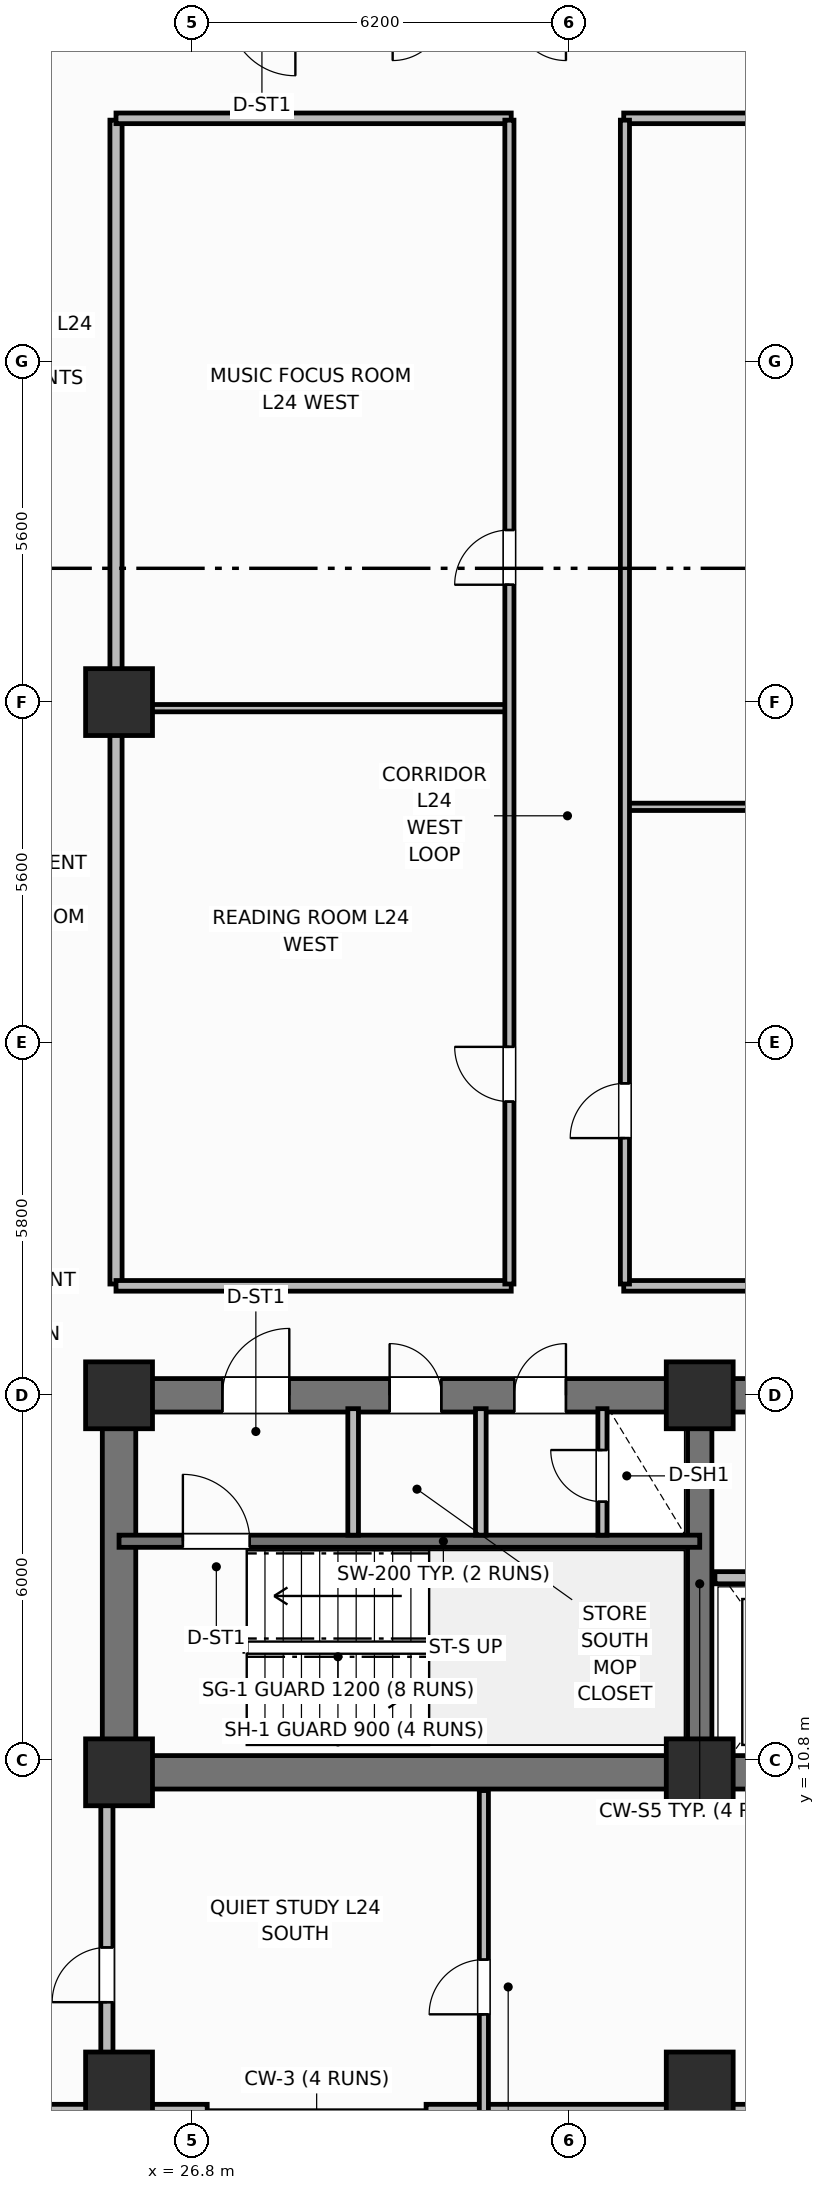
"""IFC4 building model, lengths in metres.
Left out: names, types, materials, properties, quantities, classifications, styles, units other than length and angle.
Written with IfcOpenShell. Run it as: python <this file> out.ifc"""

import sys

from ifc_helpers import new_model, si_unit, direction, frame, frame_2d, origin, origin_2d, place, context, subcontext, project, spatial, rectangle, extrude, element, fill, save


model = new_model("IFC4")
c1 = context("Model", 3, precision=1e-05, world=origin(), true_north=direction((0.0, 1.0)))
c2 = subcontext(c1, "Body", "Model", "MODEL_VIEW")
j1 = project(units=[si_unit("LENGTHUNIT", "METRE"), si_unit("PLANEANGLEUNIT", "RADIAN")], contexts=[c1])
p1 = place(None, origin())
s1 = spatial("IfcSite", under=j1, at=p1, CompositionType="ELEMENT")
p2 = place(p1, origin())
s2 = spatial("IfcBuilding", under=s1, at=p2, CompositionType="ELEMENT")
p3 = place(p2, frame((0.0, 0.0, 99.4)))
s3 = spatial("IfcBuildingStorey", under=s2, at=p3, CompositionType="ELEMENT", Elevation=99.4)
p4 = place(p3, frame((52.8, 10.6, 0.0), z_axis=(0.0, 0.0, 1.0), x_axis=(-1.0, 0.0, 0.0)))
e1 = element("IfcWall", 1, at=p4, inside=s3, PredefinedType="SHEAR", context=c2, shape_type="SweptSolid", body=[
    extrude(rectangle(XDim=27.2, YDim=0.55, at=frame_2d((13.6, 0.0))), origin(), (0.0, 0.0, 1.0), 3.7),
])
p5 = place(p3, frame((25.6, 10.875, 0.0), z_axis=(0.0, 0.0, 1.0), x_axis=(0.0, 1.0, 0.0)))
e2 = element("IfcWall", 2, at=p5, inside=s3, PredefinedType="SHEAR", context=c2, shape_type="SweptSolid", body=[
    extrude(rectangle(XDim=5.65, YDim=0.55, at=frame_2d((2.825, 0.0))), origin(), (0.0, 0.0, 1.0), 3.7),
])
p6 = place(p3, frame((25.6, 16.8, 0.0), z_axis=(0.0, 0.0, 1.0), x_axis=(1.0, 0.0, 0.0)))
e3 = element("IfcWall", 3, at=p6, inside=s3, PredefinedType="SHEAR", context=c2, shape_type="SweptSolid", body=[
    extrude(rectangle(XDim=27.2, YDim=0.55, at=frame_2d((13.6, 0.0))), origin(), (0.0, 0.0, 1.0), 3.7),
])
p7 = place(p6, frame((1.7, 0.0, 0.0)))
e4 = element("IfcOpeningElement", 4, at=p7, cuts=e3, PredefinedType="OPENING", context=c2, shape_type="SweptSolid", body=[
    extrude(rectangle(XDim=1.1, YDim=2.15, at=frame_2d((0.55, 1.075))), frame((0.0, 0.285, 0.0), z_axis=(0.0, -1.0, 0.0), x_axis=(1.0, 0.0, 0.0)), (0.0, 0.0, 1.0), 0.57),
])
p8 = place(p6, frame((4.45, 0.0, 0.0)))
e5 = element("IfcOpeningElement", 5, at=p8, cuts=e3, PredefinedType="OPENING", context=c2, shape_type="SweptSolid", body=[
    extrude(rectangle(XDim=0.85, YDim=2.1, at=frame_2d((0.425, 1.05))), frame((0.0, 0.285, 0.0), z_axis=(0.0, -1.0, 0.0), x_axis=(1.0, 0.0, 0.0)), (0.0, 0.0, 1.0), 0.57),
])
p9 = place(p6, frame((6.5, 0.0, 0.0)))
e6 = element("IfcOpeningElement", 6, at=p9, cuts=e3, PredefinedType="OPENING", context=c2, shape_type="SweptSolid", body=[
    extrude(rectangle(XDim=0.85, YDim=2.1, at=frame_2d((0.425, 1.05))), frame((0.0, 0.285, 0.0), z_axis=(0.0, -1.0, 0.0), x_axis=(1.0, 0.0, 0.0)), (0.0, 0.0, 1.0), 0.57),
])
p10 = place(p6, frame((13.0, 0.0, 0.0)))
e7 = element("IfcOpeningElement", 7, at=p10, cuts=e3, PredefinedType="OPENING", context=c2, shape_type="SweptSolid", body=[
    extrude(rectangle(XDim=1.2, YDim=2.15, at=frame_2d((0.6, 1.075))), frame((0.0, 0.285, 0.0), z_axis=(0.0, -1.0, 0.0), x_axis=(1.0, 0.0, 0.0)), (0.0, 0.0, 1.0), 0.57),
])
p11 = place(p6, frame((19.8, 0.0, 0.0)))
e8 = element("IfcOpeningElement", 8, at=p11, cuts=e3, PredefinedType="OPENING", context=c2, shape_type="SweptSolid", body=[
    extrude(rectangle(XDim=0.85, YDim=2.1, at=frame_2d((0.425, 1.05))), frame((0.0, 0.285, 0.0), z_axis=(0.0, -1.0, 0.0), x_axis=(1.0, 0.0, 0.0)), (0.0, 0.0, 1.0), 0.57),
])
p12 = place(p6, frame((24.2, 0.0, 0.0)))
e9 = element("IfcOpeningElement", 9, at=p12, cuts=e3, PredefinedType="OPENING", context=c2, shape_type="SweptSolid", body=[
    extrude(rectangle(XDim=0.85, YDim=2.1, at=frame_2d((0.425, 1.05))), frame((0.0, 0.285, 0.0), z_axis=(0.0, -1.0, 0.0), x_axis=(1.0, 0.0, 0.0)), (0.0, 0.0, 1.0), 0.57),
])
p13 = place(p3, frame((35.15, 10.875, 0.0), z_axis=(0.0, 0.0, 1.0), x_axis=(0.0, 1.0, 0.0)))
e10 = element("IfcWall", 10, at=p13, inside=s3, PredefinedType="SHEAR", context=c2, shape_type="SweptSolid", body=[
    extrude(rectangle(XDim=5.65, YDim=0.4, at=frame_2d((2.825, 0.0))), origin(), (0.0, 0.0, 1.0), 3.7),
])
for number, where, z_axis, x_axis in (
    (11, (25.6, 10.6, 0.0), (0.0, 0.0, 1.0), (1.0, 0.0, 0.0)),
    (12, (25.6, 16.8, 0.0), (0.0, 0.0, 1.0), (1.0, 0.0, 0.0)),
    (13, (35.15, 10.6, 0.0), (0.0, 0.0, 1.0), (1.0, 0.0, 0.0)),
    (14, (35.15, 16.8, 0.0), (0.0, 0.0, 1.0), (1.0, 0.0, 0.0)),
    (15, (25.6, 28.2, 0.0), (0.0, 0.0, 1.0), (1.0, 0.0, 0.0)),
    (16, (25.6, 5.45, 0.0), (0.0, 0.0, 1.0), (1.0, 0.0, 0.0)),
    (17, (35.15, 5.45, 0.0), (0.0, 0.0, 1.0), (1.0, 0.0, 0.0)),
):
    element("IfcColumn", number, at=place(p3, frame(where, z_axis=z_axis, x_axis=x_axis)), inside=s3, PredefinedType="COLUMN", context=c2, shape_type="SweptSolid", body=[
        extrude(rectangle(XDim=1.1, YDim=1.1, at=origin_2d()), origin(), (0.0, 0.0, 1.0), 3.7),
    ])
p14 = place(p3, frame((18.6, 4.97, 0.0), z_axis=(0.0, 0.0, 1.0), x_axis=(1.0, 0.0, 0.0)))
e18 = element("IfcWall", 18, at=p14, inside=s3, PredefinedType="SOLIDWALL", context=c2, shape_type="SweptSolid", body=[
    extrude(rectangle(XDim=8.45, YDim=0.34, at=frame_2d((4.225, 0.0))), origin(), (0.0, 0.0, 1.0), 2.7),
])
p15 = place(p3, frame((30.65, 4.97, 0.0), z_axis=(0.0, 0.0, 1.0), x_axis=(1.0, 0.0, 0.0)))
e19 = element("IfcWall", 19, at=p15, inside=s3, PredefinedType="SOLIDWALL", context=c2, shape_type="SweptSolid", body=[
    extrude(rectangle(XDim=5.35, YDim=0.34, at=frame_2d((2.675, 0.0))), origin(), (0.0, 0.0, 1.0), 2.7),
])
p16 = place(p3, frame((25.6, 14.4, 0.0), z_axis=(0.0, 0.0, 1.0), x_axis=(1.0, 0.0, 0.0)))
e20 = element("IfcWall", 20, at=p16, inside=s3, PredefinedType="SHEAR", context=c2, shape_type="SweptSolid", body=[
    extrude(rectangle(XDim=9.55, YDim=0.2, at=frame_2d((4.775, 0.0))), origin(), (0.0, 0.0, 1.0), 3.7),
])
p17 = place(p16, frame((1.05, 0.0, 0.0)))
e21 = element("IfcOpeningElement", 21, at=p17, cuts=e20, PredefinedType="OPENING", context=c2, shape_type="SweptSolid", body=[
    extrude(rectangle(XDim=1.1, YDim=2.15, at=frame_2d((0.55, 1.075))), frame((0.0, 0.11, 0.0), z_axis=(0.0, -1.0, 0.0), x_axis=(1.0, 0.0, 0.0)), (0.0, 0.0, 1.0), 0.22),
])
for number, where, z_axis, x_axis in (
    (22, (29.45, 14.5, 0.0), (0.0, 0.0, 1.0), (0.0, 1.0, 0.0)),
    (23, (31.55, 14.5, 0.0), (0.0, 0.0, 1.0), (0.0, 1.0, 0.0)),
):
    element("IfcWall", number, at=place(p3, frame(where, z_axis=z_axis, x_axis=x_axis)), inside=s3, PredefinedType="PARTITIONING", context=c2, shape_type="SweptSolid", body=[
        extrude(rectangle(XDim=2.08, YDim=0.175, at=frame_2d((1.04, 0.0))), origin(), (0.0, 0.0, 1.0), 2.53),
    ])
p18 = place(p3, frame((33.55, 14.5, 0.0), z_axis=(0.0, 0.0, 1.0), x_axis=(0.0, 1.0, 0.0)))
e24 = element("IfcWall", 24, at=p18, inside=s3, PredefinedType="PARTITIONING", context=c2, shape_type="SweptSolid", body=[
    extrude(rectangle(XDim=2.08, YDim=0.15, at=frame_2d((1.04, 0.0))), origin(), (0.0, 0.0, 1.0), 2.53),
])
p19 = place(p18, frame((0.55, 0.0, 0.0)))
e25 = element("IfcOpeningElement", 25, at=p19, cuts=e24, PredefinedType="OPENING", context=c2, shape_type="SweptSolid", body=[
    extrude(rectangle(XDim=0.85, YDim=2.05, at=frame_2d((0.425, 1.025))), frame((0.0, 0.085, 0.0), z_axis=(0.0, -1.0, 0.0), x_axis=(1.0, 0.0, 0.0)), (0.0, 0.0, 1.0), 0.17),
])
p20 = place(p3, frame((35.4, 13.8, 0.0), z_axis=(0.0, 0.0, 1.0), x_axis=(1.0, 0.0, 0.0)))
e26 = element("IfcWall", 26, at=p20, inside=s3, PredefinedType="PARTITIONING", context=c2, shape_type="SweptSolid", body=[
    extrude(rectangle(XDim=7.6, YDim=0.2, at=frame_2d((3.8, 0.0))), origin(), (0.0, 0.0, 1.0), 2.3),
])
p21 = place(p20, frame((0.7, 0.0, 0.0)))
e27 = element("IfcOpeningElement", 27, at=p21, cuts=e26, PredefinedType="OPENING", context=c2, shape_type="SweptSolid", body=[
    extrude(rectangle(XDim=1.1, YDim=2.15, at=frame_2d((0.55, 1.075))), frame((0.0, 0.11, 0.0), z_axis=(0.0, -1.0, 0.0), x_axis=(1.0, 0.0, 0.0)), (0.0, 0.0, 1.0), 0.22),
])
p22 = place(p20, frame((3.35, 0.0, 0.0)))
e28 = element("IfcOpeningElement", 28, at=p22, cuts=e26, PredefinedType="OPENING", context=c2, shape_type="SweptSolid", body=[
    extrude(rectangle(XDim=1.2, YDim=2.15, at=frame_2d((0.6, 1.075))), frame((0.0, 0.11, 0.0), z_axis=(0.0, -1.0, 0.0), x_axis=(1.0, 0.0, 0.0)), (0.0, 0.0, 1.0), 0.22),
])
p23 = place(p3, frame((25.55, 18.63, 0.0), z_axis=(0.0, 0.0, 1.0), x_axis=(0.0, 1.0, 0.0)))
e29 = element("IfcWall", 29, at=p23, inside=s3, PredefinedType="PARTITIONING", context=c2, shape_type="SweptSolid", body=[
    extrude(rectangle(XDim=19.14, YDim=0.2, at=frame_2d((9.57, 0.0))), origin(), (0.0, 0.0, 1.0), 2.53),
])
for number, where, z_axis, x_axis in (
    (30, (25.55, 18.6, 0.0), (0.0, 0.0, 1.0), (1.0, 0.0, 0.0)),
    (31, (25.55, 37.8, 0.0), (0.0, 0.0, 1.0), (1.0, 0.0, 0.0)),
):
    element("IfcWall", number, at=place(p3, frame(where, z_axis=z_axis, x_axis=x_axis)), inside=s3, PredefinedType="PARTITIONING", context=c2, shape_type="SweptSolid", body=[
        extrude(rectangle(XDim=6.5, YDim=0.175, at=frame_2d((3.25, 0.0))), origin(), (0.0, 0.0, 1.0), 2.53),
    ])
for number, where, z_axis, x_axis in (
    (32, (33.9, 18.6, 0.0), (0.0, 0.0, 1.0), (1.0, 0.0, 0.0)),
    (33, (33.9, 37.8, 0.0), (0.0, 0.0, 1.0), (1.0, 0.0, 0.0)),
):
    element("IfcWall", number, at=place(p3, frame(where, z_axis=z_axis, x_axis=x_axis)), inside=s3, PredefinedType="PARTITIONING", context=c2, shape_type="SweptSolid", body=[
        extrude(rectangle(XDim=10.6, YDim=0.175, at=frame_2d((5.3, 0.0))), origin(), (0.0, 0.0, 1.0), 2.53),
    ])
p24 = place(p3, frame((25.6, 28.1, 0.0), z_axis=(0.0, 0.0, 1.0), x_axis=(1.0, 0.0, 0.0)))
e34 = element("IfcWall", 34, at=p24, inside=s3, PredefinedType="PARTITIONING", context=c2, shape_type="SweptSolid", body=[
    extrude(rectangle(XDim=6.42, YDim=0.12, at=frame_2d((3.21, 0.0))), origin(), (0.0, 0.0, 1.0), 2.53),
])
p25 = place(p3, frame((33.92, 26.477, 0.0), z_axis=(0.0, 0.0, 1.0), x_axis=(1.0, 0.0, 0.0)))
e35 = element("IfcWall", 35, at=p25, inside=s3, PredefinedType="PARTITIONING", context=c2, shape_type="SweptSolid", body=[
    extrude(rectangle(XDim=10.56, YDim=0.12, at=frame_2d((5.28, 0.0))), origin(), (0.0, 0.0, 1.0), 2.53),
])
p26 = place(p3, frame((32.02, 18.63, 0.0), z_axis=(0.0, 0.0, 1.0), x_axis=(0.0, 1.0, 0.0)))
e36 = element("IfcWall", 36, at=p26, inside=s3, PredefinedType="PARTITIONING", context=c2, shape_type="SweptSolid", body=[
    extrude(rectangle(XDim=19.14, YDim=0.15, at=frame_2d((9.57, 0.0))), origin(), (0.0, 0.0, 1.0), 2.53),
])
p27 = place(p26, frame((3.0, 0.0, 0.0)))
e37 = element("IfcOpeningElement", 37, at=p27, cuts=e36, PredefinedType="OPENING", context=c2, shape_type="SweptSolid", body=[
    extrude(rectangle(XDim=0.9, YDim=2.1, at=frame_2d((0.45, 1.05))), frame((0.0, 0.085, 0.0), z_axis=(0.0, -1.0, 0.0), x_axis=(1.0, 0.0, 0.0)), (0.0, 0.0, 1.0), 0.17),
])
p28 = place(p26, frame((11.5, 0.0, 0.0)))
e38 = element("IfcOpeningElement", 38, at=p28, cuts=e36, PredefinedType="OPENING", context=c2, shape_type="SweptSolid", body=[
    extrude(rectangle(XDim=0.9, YDim=2.1, at=frame_2d((0.45, 1.05))), frame((0.0, 0.085, 0.0), z_axis=(0.0, -1.0, 0.0), x_axis=(1.0, 0.0, 0.0)), (0.0, 0.0, 1.0), 0.17),
])
p29 = place(p3, frame((33.92, 18.63, 0.0), z_axis=(0.0, 0.0, 1.0), x_axis=(0.0, 1.0, 0.0)))
e39 = element("IfcWall", 39, at=p29, inside=s3, PredefinedType="PARTITIONING", context=c2, shape_type="SweptSolid", body=[
    extrude(rectangle(XDim=19.14, YDim=0.15, at=frame_2d((9.57, 0.0))), origin(), (0.0, 0.0, 1.0), 2.53),
])
p30 = place(p29, frame((2.4, 0.0, 0.0)))
e40 = element("IfcOpeningElement", 40, at=p30, cuts=e39, PredefinedType="OPENING", context=c2, shape_type="SweptSolid", body=[
    extrude(rectangle(XDim=0.9, YDim=2.1, at=frame_2d((0.45, 1.05))), frame((0.0, 0.085, 0.0), z_axis=(0.0, -1.0, 0.0), x_axis=(1.0, 0.0, 0.0)), (0.0, 0.0, 1.0), 0.17),
])
p31 = place(p3, frame((31.6, 4.97, 0.0), z_axis=(0.0, 0.0, 1.0), x_axis=(0.0, 1.0, 0.0)))
e41 = element("IfcWall", 41, at=p31, inside=s3, PredefinedType="PARTITIONING", context=c2, shape_type="SweptSolid", body=[
    extrude(rectangle(XDim=5.33, YDim=0.15, at=frame_2d((2.665, 0.0))), origin(), (0.0, 0.0, 1.0), 2.53),
])
p32 = place(p31, frame((1.65, 0.0, 0.0)))
e42 = element("IfcOpeningElement", 42, at=p32, cuts=e41, PredefinedType="OPENING", context=c2, shape_type="SweptSolid", body=[
    extrude(rectangle(XDim=0.9, YDim=2.1, at=frame_2d((0.45, 1.05))), frame((0.0, 0.085, 0.0), z_axis=(0.0, -1.0, 0.0), x_axis=(1.0, 0.0, 0.0)), (0.0, 0.0, 1.0), 0.17),
])
p33 = place(p3, frame((25.4, 5.97, 0.0), z_axis=(0.0, 0.0, 1.0), x_axis=(0.0, 1.0, 0.0)))
e43 = element("IfcWall", 43, at=p33, inside=s3, PredefinedType="PARTITIONING", context=c2, shape_type="SweptSolid", body=[
    extrude(rectangle(XDim=4.33, YDim=0.2, at=frame_2d((2.165, 0.0))), origin(), (0.0, 0.0, 1.0), 2.53),
])
p34 = place(p33, frame((0.85, 0.0, 0.0)))
e44 = element("IfcOpeningElement", 44, at=p34, cuts=e43, PredefinedType="OPENING", context=c2, shape_type="SweptSolid", body=[
    extrude(rectangle(XDim=0.9, YDim=2.1, at=frame_2d((0.45, 1.05))), frame((0.0, 0.11, 0.0), z_axis=(0.0, -1.0, 0.0), x_axis=(1.0, 0.0, 0.0)), (0.0, 0.0, 1.0), 0.22),
])
p35 = place(p17, origin())
e45 = element("IfcDoor", 45, at=p35, inside=s3, OperationType="SINGLE_SWING_LEFT", PredefinedType="DOOR", context=c2, shape_type="SweptSolid", body=[
    extrude(rectangle(XDim=1.1, YDim=2.15, at=frame_2d((0.55, 1.075))), frame((0.0, 0.025, 0.0), z_axis=(0.0, -1.0, 0.0), x_axis=(1.0, 0.0, 0.0)), (0.0, 0.0, 1.0), 0.05),
])
fill(e21, e45)
p36 = place(p19, origin())
e46 = element("IfcDoor", 46, at=p36, inside=s3, OperationType="SINGLE_SWING_RIGHT", PredefinedType="TRAPDOOR", context=c2, shape_type="SweptSolid", body=[
    extrude(rectangle(XDim=0.85, YDim=2.05, at=frame_2d((0.425, 1.025))), frame((0.0, 0.025, 0.0), z_axis=(0.0, -1.0, 0.0), x_axis=(1.0, 0.0, 0.0)), (0.0, 0.0, 1.0), 0.05),
])
fill(e25, e46)
p37 = place(p27, origin())
e47 = element("IfcDoor", 47, at=p37, inside=s3, OperationType="SINGLE_SWING_RIGHT", PredefinedType="DOOR", context=c2, shape_type="SweptSolid", body=[
    extrude(rectangle(XDim=0.9, YDim=2.1, at=frame_2d((0.45, 1.05))), frame((0.0, 0.025, 0.0), z_axis=(0.0, -1.0, 0.0), x_axis=(1.0, 0.0, 0.0)), (0.0, 0.0, 1.0), 0.05),
])
fill(e37, e47)
p38 = place(p28, origin())
e48 = element("IfcDoor", 48, at=p38, inside=s3, OperationType="SINGLE_SWING_LEFT", PredefinedType="DOOR", context=c2, shape_type="SweptSolid", body=[
    extrude(rectangle(XDim=0.9, YDim=2.1, at=frame_2d((0.45, 1.05))), frame((0.0, 0.025, 0.0), z_axis=(0.0, -1.0, 0.0), x_axis=(1.0, 0.0, 0.0)), (0.0, 0.0, 1.0), 0.05),
])
fill(e38, e48)
p39 = place(p30, origin())
e49 = element("IfcDoor", 49, at=p39, inside=s3, OperationType="SINGLE_SWING_LEFT", PredefinedType="DOOR", context=c2, shape_type="SweptSolid", body=[
    extrude(rectangle(XDim=0.9, YDim=2.1, at=frame_2d((0.45, 1.05))), frame((0.0, 0.025, 0.0), z_axis=(0.0, -1.0, 0.0), x_axis=(1.0, 0.0, 0.0)), (0.0, 0.0, 1.0), 0.05),
])
fill(e40, e49)
p40 = place(p32, origin())
e50 = element("IfcDoor", 50, at=p40, inside=s3, OperationType="SINGLE_SWING_LEFT", PredefinedType="DOOR", context=c2, shape_type="SweptSolid", body=[
    extrude(rectangle(XDim=0.9, YDim=2.1, at=frame_2d((0.45, 1.05))), frame((0.0, 0.025, 0.0), z_axis=(0.0, -1.0, 0.0), x_axis=(1.0, 0.0, 0.0)), (0.0, 0.0, 1.0), 0.05),
])
fill(e42, e50)
p41 = place(p34, origin())
e51 = element("IfcDoor", 51, at=p41, inside=s3, OperationType="SINGLE_SWING_LEFT", PredefinedType="DOOR", context=c2, shape_type="SweptSolid", body=[
    extrude(rectangle(XDim=0.9, YDim=2.1, at=frame_2d((0.45, 1.05))), frame((0.0, 0.025, 0.0), z_axis=(0.0, -1.0, 0.0), x_axis=(1.0, 0.0, 0.0)), (0.0, 0.0, 1.0), 0.05),
])
fill(e44, e51)
p42 = place(p7, origin())
e52 = element("IfcDoor", 52, at=p42, inside=s3, OperationType="SINGLE_SWING_RIGHT", PredefinedType="DOOR", context=c2, shape_type="SweptSolid", body=[
    extrude(rectangle(XDim=1.1, YDim=2.15, at=frame_2d((0.55, 1.075))), frame((0.0, 0.025, 0.0), z_axis=(0.0, -1.0, 0.0), x_axis=(1.0, 0.0, 0.0)), (0.0, 0.0, 1.0), 0.05),
])
fill(e4, e52)
p43 = place(p8, origin())
e53 = element("IfcDoor", 53, at=p43, inside=s3, OperationType="SINGLE_SWING_LEFT", PredefinedType="DOOR", context=c2, shape_type="SweptSolid", body=[
    extrude(rectangle(XDim=0.85, YDim=2.1, at=frame_2d((0.425, 1.05))), frame((0.0, 0.025, 0.0), z_axis=(0.0, -1.0, 0.0), x_axis=(1.0, 0.0, 0.0)), (0.0, 0.0, 1.0), 0.05),
])
fill(e5, e53)
p44 = place(p9, origin())
e54 = element("IfcDoor", 54, at=p44, inside=s3, OperationType="SINGLE_SWING_RIGHT", PredefinedType="DOOR", context=c2, shape_type="SweptSolid", body=[
    extrude(rectangle(XDim=0.85, YDim=2.1, at=frame_2d((0.425, 1.05))), frame((0.0, 0.025, 0.0), z_axis=(0.0, -1.0, 0.0), x_axis=(1.0, 0.0, 0.0)), (0.0, 0.0, 1.0), 0.05),
])
fill(e6, e54)
save(model, sys.argv[1])
